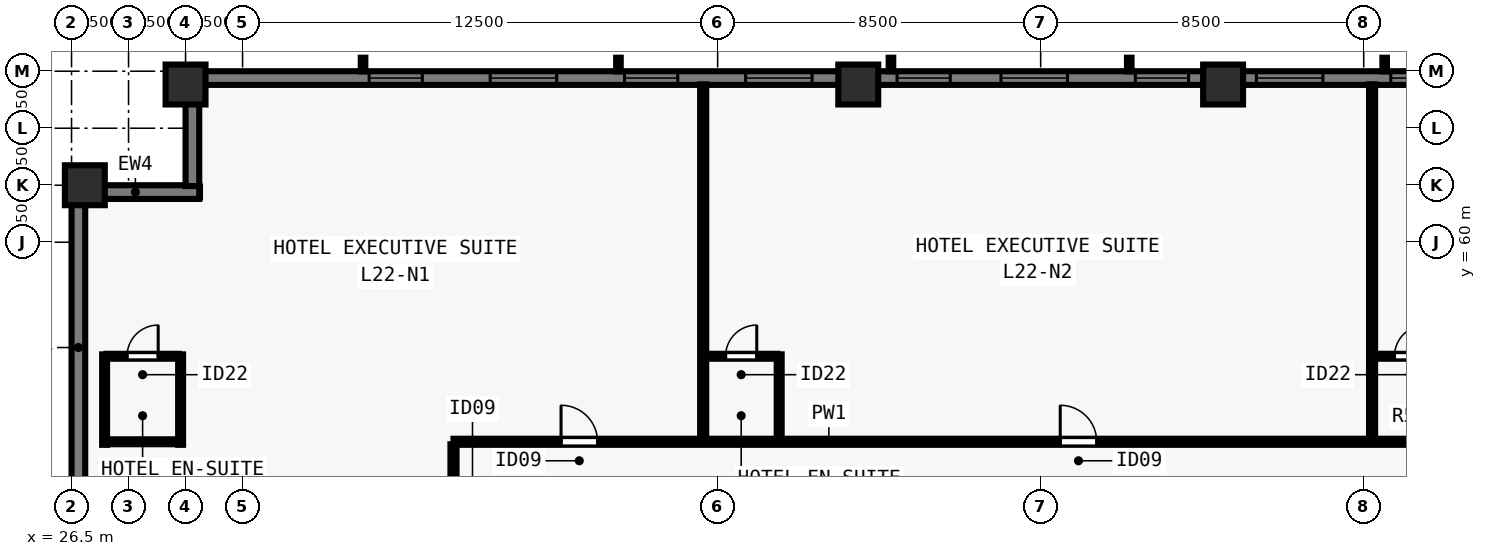
"""IFC4 building model, lengths in metres.
Left out: names, types, materials, properties, quantities, classifications, styles, units other than length and angle.
Written with IfcOpenShell. Run it as: python <this file> out.ifc"""

import sys

from ifc_helpers import new_model, si_unit, direction, frame, frame_2d, origin, origin_2d, place, context, subcontext, project, spatial, rectangle, extrude, element, fill, save


model = new_model("IFC4")
c1 = context("Model", 3, precision=1e-05, world=origin(), true_north=direction((0.0, 1.0)))
c2 = subcontext(c1, "Body", "Model", "MODEL_VIEW")
j1 = project(units=[si_unit("LENGTHUNIT", "METRE"), si_unit("PLANEANGLEUNIT", "RADIAN")], contexts=[c1])
p1 = place(None, origin())
s1 = spatial("IfcSite", under=j1, at=p1, CompositionType="ELEMENT")
p2 = place(p1, origin())
s2 = spatial("IfcBuilding", under=s1, at=p2, CompositionType="ELEMENT")
p3 = place(p2, frame((0.0, 0.0, 83.0)))
s3 = spatial("IfcBuildingStorey", under=s2, at=p3, CompositionType="ELEMENT", Elevation=83.0)
for number, where, z_axis, x_axis in (
    (1, (56.8, 64.15, 0.0), (0.0, 0.0, 1.0), (1.0, 0.0, 0.0)),
    (2, (47.2, 64.15, 0.0), (0.0, 0.0, 1.0), (1.0, 0.0, 0.0)),
    (3, (29.5, 64.15, 0.0), (0.0, 0.0, 1.0), (1.0, 0.0, 0.0)),
    (4, (26.85, 61.5, 0.0), (0.0, 0.0, 1.0), (0.0, 1.0, 0.0)),
):
    element("IfcColumn", number, at=place(p3, frame(where, z_axis=z_axis, x_axis=x_axis)), inside=s3, PredefinedType="COLUMN", context=c2, shape_type="SweptSolid", body=[
        extrude(rectangle(XDim=1.05, YDim=1.05, at=origin_2d()), origin(), (0.0, 0.0, 1.0), 3.5),
    ])
p4 = place(p3, frame((26.68, 16.5, 0.0), z_axis=(0.0, 0.0, 1.0), x_axis=(0.0, 1.0, 0.0)))
e5 = element("IfcWall", 5, at=p4, inside=s3, PredefinedType="SOLIDWALL", context=c2, shape_type="SweptSolid", body=[
    extrude(rectangle(XDim=44.662, YDim=0.36, at=frame_2d((22.331, 0.0))), origin(), (0.0, 0.0, 1.0), 3.28),
])
p5 = place(p4, frame((4.83, 0.0, 0.8)))
e6 = element("IfcOpeningElement", 6, at=p5, cuts=e5, PredefinedType="OPENING", context=c2, shape_type="SweptSolid", body=[
    extrude(rectangle(XDim=1.4, YDim=1.544, at=frame_2d((0.7, 0.772))), frame((0.0, 0.19, 0.0), z_axis=(0.0, -1.0, 0.0), x_axis=(1.0, 0.0, 0.0)), (0.0, 0.0, 1.0), 0.38),
])
p6 = place(p4, frame((8.015, 0.0, 0.8)))
e7 = element("IfcOpeningElement", 7, at=p6, cuts=e5, PredefinedType="OPENING", context=c2, shape_type="SweptSolid", body=[
    extrude(rectangle(XDim=1.75, YDim=1.544, at=frame_2d((0.875, 0.772))), frame((0.0, 0.19, 0.0), z_axis=(0.0, -1.0, 0.0), x_axis=(1.0, 0.0, 0.0)), (0.0, 0.0, 1.0), 0.38),
])
p7 = place(p4, frame((11.551, 0.0, 0.8)))
e8 = element("IfcOpeningElement", 8, at=p7, cuts=e5, PredefinedType="OPENING", context=c2, shape_type="SweptSolid", body=[
    extrude(rectangle(XDim=1.4, YDim=1.544, at=frame_2d((0.7, 0.772))), frame((0.0, 0.19, 0.0), z_axis=(0.0, -1.0, 0.0), x_axis=(1.0, 0.0, 0.0)), (0.0, 0.0, 1.0), 0.38),
])
p8 = place(p4, frame((18.721, 0.0, 0.8)))
e9 = element("IfcOpeningElement", 9, at=p8, cuts=e5, PredefinedType="OPENING", context=c2, shape_type="SweptSolid", body=[
    extrude(rectangle(XDim=1.4, YDim=1.544, at=frame_2d((0.7, 0.772))), frame((0.0, 0.19, 0.0), z_axis=(0.0, -1.0, 0.0), x_axis=(1.0, 0.0, 0.0)), (0.0, 0.0, 1.0), 0.38),
])
p9 = place(p4, frame((22.706, 0.0, 0.8)))
e10 = element("IfcOpeningElement", 10, at=p9, cuts=e5, PredefinedType="OPENING", context=c2, shape_type="SweptSolid", body=[
    extrude(rectangle(XDim=1.75, YDim=1.544, at=frame_2d((0.875, 0.772))), frame((0.0, 0.19, 0.0), z_axis=(0.0, -1.0, 0.0), x_axis=(1.0, 0.0, 0.0)), (0.0, 0.0, 1.0), 0.38),
])
p10 = place(p4, frame((24.991, 0.0, 0.8)))
e11 = element("IfcOpeningElement", 11, at=p10, cuts=e5, PredefinedType="OPENING", context=c2, shape_type="SweptSolid", body=[
    extrude(rectangle(XDim=1.4, YDim=1.544, at=frame_2d((0.7, 0.772))), frame((0.0, 0.19, 0.0), z_axis=(0.0, -1.0, 0.0), x_axis=(1.0, 0.0, 0.0)), (0.0, 0.0, 1.0), 0.38),
])
p11 = place(p4, frame((28.177, 0.0, 0.8)))
e12 = element("IfcOpeningElement", 12, at=p11, cuts=e5, PredefinedType="OPENING", context=c2, shape_type="SweptSolid", body=[
    extrude(rectangle(XDim=1.75, YDim=1.544, at=frame_2d((0.875, 0.772))), frame((0.0, 0.19, 0.0), z_axis=(0.0, -1.0, 0.0), x_axis=(1.0, 0.0, 0.0)), (0.0, 0.0, 1.0), 0.38),
])
p12 = place(p4, frame((31.711, 0.0, 0.8)))
e13 = element("IfcOpeningElement", 13, at=p12, cuts=e5, PredefinedType="OPENING", context=c2, shape_type="SweptSolid", body=[
    extrude(rectangle(XDim=1.4, YDim=1.544, at=frame_2d((0.7, 0.772))), frame((0.0, 0.19, 0.0), z_axis=(0.0, -1.0, 0.0), x_axis=(1.0, 0.0, 0.0)), (0.0, 0.0, 1.0), 0.38),
])
p13 = place(p4, frame((34.897, 0.0, 0.8)))
e14 = element("IfcOpeningElement", 14, at=p13, cuts=e5, PredefinedType="OPENING", context=c2, shape_type="SweptSolid", body=[
    extrude(rectangle(XDim=1.75, YDim=1.544, at=frame_2d((0.875, 0.772))), frame((0.0, 0.19, 0.0), z_axis=(0.0, -1.0, 0.0), x_axis=(1.0, 0.0, 0.0)), (0.0, 0.0, 1.0), 0.38),
])
p14 = place(p3, frame((26.5, 61.32, 0.0), z_axis=(0.0, 0.0, 1.0), x_axis=(1.0, 0.0, 0.0)))
e15 = element("IfcWall", 15, at=p14, inside=s3, PredefinedType="SOLIDWALL", context=c2, shape_type="SweptSolid", body=[
    extrude(rectangle(XDim=3.36, YDim=0.36, at=frame_2d((1.68, 0.0))), origin(), (0.0, 0.0, 1.0), 3.28),
])
p15 = place(p3, frame((29.68, 61.478, 0.0), z_axis=(0.0, 0.0, 1.0), x_axis=(0.0, 1.0, 0.0)))
e16 = element("IfcWall", 16, at=p15, inside=s3, PredefinedType="SOLIDWALL", context=c2, shape_type="SweptSolid", body=[
    extrude(rectangle(XDim=2.684, YDim=0.36, at=frame_2d((1.342, 0.0))), origin(), (0.0, 0.0, 1.0), 3.28),
])
p16 = place(p3, frame((29.5, 64.32, 0.0), z_axis=(0.0, 0.0, 1.0), x_axis=(1.0, 0.0, 0.0)))
e17 = element("IfcWall", 17, at=p16, inside=s3, PredefinedType="SOLIDWALL", context=c2, shape_type="SweptSolid", body=[
    extrude(rectangle(XDim=44.662, YDim=0.36, at=frame_2d((22.331, 0.0))), origin(), (0.0, 0.0, 1.0), 3.28),
])
p17 = place(p16, frame((4.83, 0.0, 0.8)))
e18 = element("IfcOpeningElement", 18, at=p17, cuts=e17, PredefinedType="OPENING", context=c2, shape_type="SweptSolid", body=[
    extrude(rectangle(XDim=1.4, YDim=1.544, at=frame_2d((0.7, 0.772))), frame((0.0, 0.19, 0.0), z_axis=(0.0, -1.0, 0.0), x_axis=(1.0, 0.0, 0.0)), (0.0, 0.0, 1.0), 0.38),
])
p18 = place(p16, frame((8.015, 0.0, 0.8)))
e19 = element("IfcOpeningElement", 19, at=p18, cuts=e17, PredefinedType="OPENING", context=c2, shape_type="SweptSolid", body=[
    extrude(rectangle(XDim=1.75, YDim=1.544, at=frame_2d((0.875, 0.772))), frame((0.0, 0.19, 0.0), z_axis=(0.0, -1.0, 0.0), x_axis=(1.0, 0.0, 0.0)), (0.0, 0.0, 1.0), 0.38),
])
p19 = place(p16, frame((11.551, 0.0, 0.8)))
e20 = element("IfcOpeningElement", 20, at=p19, cuts=e17, PredefinedType="OPENING", context=c2, shape_type="SweptSolid", body=[
    extrude(rectangle(XDim=1.4, YDim=1.544, at=frame_2d((0.7, 0.772))), frame((0.0, 0.19, 0.0), z_axis=(0.0, -1.0, 0.0), x_axis=(1.0, 0.0, 0.0)), (0.0, 0.0, 1.0), 0.38),
])
p20 = place(p16, frame((14.736, 0.0, 0.8)))
e21 = element("IfcOpeningElement", 21, at=p20, cuts=e17, PredefinedType="OPENING", context=c2, shape_type="SweptSolid", body=[
    extrude(rectangle(XDim=1.75, YDim=1.544, at=frame_2d((0.875, 0.772))), frame((0.0, 0.19, 0.0), z_axis=(0.0, -1.0, 0.0), x_axis=(1.0, 0.0, 0.0)), (0.0, 0.0, 1.0), 0.38),
])
p21 = place(p16, frame((18.721, 0.0, 0.8)))
e22 = element("IfcOpeningElement", 22, at=p21, cuts=e17, PredefinedType="OPENING", context=c2, shape_type="SweptSolid", body=[
    extrude(rectangle(XDim=1.4, YDim=1.544, at=frame_2d((0.7, 0.772))), frame((0.0, 0.19, 0.0), z_axis=(0.0, -1.0, 0.0), x_axis=(1.0, 0.0, 0.0)), (0.0, 0.0, 1.0), 0.38),
])
p22 = place(p16, frame((21.456, 0.0, 0.8)))
e23 = element("IfcOpeningElement", 23, at=p22, cuts=e17, PredefinedType="OPENING", context=c2, shape_type="SweptSolid", body=[
    extrude(rectangle(XDim=1.75, YDim=1.544, at=frame_2d((0.875, 0.772))), frame((0.0, 0.19, 0.0), z_axis=(0.0, -1.0, 0.0), x_axis=(1.0, 0.0, 0.0)), (0.0, 0.0, 1.0), 0.38),
])
p23 = place(p16, frame((24.991, 0.0, 0.8)))
e24 = element("IfcOpeningElement", 24, at=p23, cuts=e17, PredefinedType="OPENING", context=c2, shape_type="SweptSolid", body=[
    extrude(rectangle(XDim=1.4, YDim=1.544, at=frame_2d((0.7, 0.772))), frame((0.0, 0.19, 0.0), z_axis=(0.0, -1.0, 0.0), x_axis=(1.0, 0.0, 0.0)), (0.0, 0.0, 1.0), 0.38),
])
p24 = place(p16, frame((28.177, 0.0, 0.8)))
e25 = element("IfcOpeningElement", 25, at=p24, cuts=e17, PredefinedType="OPENING", context=c2, shape_type="SweptSolid", body=[
    extrude(rectangle(XDim=1.75, YDim=1.544, at=frame_2d((0.875, 0.772))), frame((0.0, 0.19, 0.0), z_axis=(0.0, -1.0, 0.0), x_axis=(1.0, 0.0, 0.0)), (0.0, 0.0, 1.0), 0.38),
])
p25 = place(p16, frame((31.711, 0.0, 0.8)))
e26 = element("IfcOpeningElement", 26, at=p25, cuts=e17, PredefinedType="OPENING", context=c2, shape_type="SweptSolid", body=[
    extrude(rectangle(XDim=1.4, YDim=1.544, at=frame_2d((0.7, 0.772))), frame((0.0, 0.19, 0.0), z_axis=(0.0, -1.0, 0.0), x_axis=(1.0, 0.0, 0.0)), (0.0, 0.0, 1.0), 0.38),
])
p26 = place(p16, frame((34.897, 0.0, 0.8)))
e27 = element("IfcOpeningElement", 27, at=p26, cuts=e17, PredefinedType="OPENING", context=c2, shape_type="SweptSolid", body=[
    extrude(rectangle(XDim=1.75, YDim=1.544, at=frame_2d((0.875, 0.772))), frame((0.0, 0.19, 0.0), z_axis=(0.0, -1.0, 0.0), x_axis=(1.0, 0.0, 0.0)), (0.0, 0.0, 1.0), 0.38),
])
p27 = place(p16, frame((38.432, 0.0, 0.8)))
e28 = element("IfcOpeningElement", 28, at=p27, cuts=e17, PredefinedType="OPENING", context=c2, shape_type="SweptSolid", body=[
    extrude(rectangle(XDim=1.4, YDim=1.544, at=frame_2d((0.7, 0.772))), frame((0.0, 0.19, 0.0), z_axis=(0.0, -1.0, 0.0), x_axis=(1.0, 0.0, 0.0)), (0.0, 0.0, 1.0), 0.38),
])
p28 = place(p3, frame((36.55, 54.75, 0.0), z_axis=(0.0, 0.0, 1.0), x_axis=(1.0, 0.0, 0.0)))
e29 = element("IfcWall", 29, at=p28, inside=s3, PredefinedType="PARTITIONING", context=c2, shape_type="SweptSolid", body=[
    extrude(rectangle(XDim=30.9, YDim=0.16, at=frame_2d((15.45, 0.0))), origin(), (0.0, 0.0, 1.0), 3.28),
])
p29 = place(p28, frame((2.83, 0.0, 0.0)))
e30 = element("IfcOpeningElement", 30, at=p29, cuts=e29, PredefinedType="OPENING", context=c2, shape_type="SweptSolid", body=[
    extrude(rectangle(XDim=0.96, YDim=2.15, at=frame_2d((0.48, 1.075))), frame((0.0, 0.09, 0.0), z_axis=(0.0, -1.0, 0.0), x_axis=(1.0, 0.0, 0.0)), (0.0, 0.0, 1.0), 0.18),
])
p30 = place(p28, frame((15.965, 0.0, 0.0)))
e31 = element("IfcOpeningElement", 31, at=p30, cuts=e29, PredefinedType="OPENING", context=c2, shape_type="SweptSolid", body=[
    extrude(rectangle(XDim=0.96, YDim=2.15, at=frame_2d((0.48, 1.075))), frame((0.0, 0.09, 0.0), z_axis=(0.0, -1.0, 0.0), x_axis=(1.0, 0.0, 0.0)), (0.0, 0.0, 1.0), 0.18),
])
p31 = place(p28, frame((28.105, 0.0, 0.0)))
e32 = element("IfcOpeningElement", 32, at=p31, cuts=e29, PredefinedType="OPENING", context=c2, shape_type="SweptSolid", body=[
    extrude(rectangle(XDim=0.96, YDim=2.15, at=frame_2d((0.48, 1.075))), frame((0.0, 0.09, 0.0), z_axis=(0.0, -1.0, 0.0), x_axis=(1.0, 0.0, 0.0)), (0.0, 0.0, 1.0), 0.18),
])
p32 = place(p3, frame((36.55, 23.315, 0.0), z_axis=(0.0, 0.0, 1.0), x_axis=(0.0, 1.0, 0.0)))
e33 = element("IfcWall", 33, at=p32, inside=s3, PredefinedType="PARTITIONING", context=c2, shape_type="SweptSolid", body=[
    extrude(rectangle(XDim=31.37, YDim=0.16, at=frame_2d((15.685, 0.0))), origin(), (0.0, 0.0, 1.0), 3.28),
])
p33 = place(p32, frame((4.848, 0.0, 0.0)))
e34 = element("IfcOpeningElement", 34, at=p33, cuts=e33, PredefinedType="OPENING", context=c2, shape_type="SweptSolid", body=[
    extrude(rectangle(XDim=0.96, YDim=2.15, at=frame_2d((0.48, 1.075))), frame((0.0, 0.09, 0.0), z_axis=(0.0, -1.0, 0.0), x_axis=(1.0, 0.0, 0.0)), (0.0, 0.0, 1.0), 0.18),
])
p34 = place(p32, frame((12.39, 0.0, 0.0)))
e35 = element("IfcOpeningElement", 35, at=p34, cuts=e33, PredefinedType="OPENING", context=c2, shape_type="SweptSolid", body=[
    extrude(rectangle(XDim=0.96, YDim=2.15, at=frame_2d((0.48, 1.075))), frame((0.0, 0.09, 0.0), z_axis=(0.0, -1.0, 0.0), x_axis=(1.0, 0.0, 0.0)), (0.0, 0.0, 1.0), 0.18),
])
p35 = place(p32, frame((20.265, 0.0, 0.0)))
e36 = element("IfcOpeningElement", 36, at=p35, cuts=e33, PredefinedType="OPENING", context=c2, shape_type="SweptSolid", body=[
    extrude(rectangle(XDim=0.96, YDim=2.15, at=frame_2d((0.48, 1.075))), frame((0.0, 0.09, 0.0), z_axis=(0.0, -1.0, 0.0), x_axis=(1.0, 0.0, 0.0)), (0.0, 0.0, 1.0), 0.18),
])
p36 = place(p32, frame((28.223, 0.0, 0.0)))
e37 = element("IfcOpeningElement", 37, at=p36, cuts=e33, PredefinedType="OPENING", context=c2, shape_type="SweptSolid", body=[
    extrude(rectangle(XDim=0.96, YDim=2.15, at=frame_2d((0.48, 1.075))), frame((0.0, 0.09, 0.0), z_axis=(0.0, -1.0, 0.0), x_axis=(1.0, 0.0, 0.0)), (0.0, 0.0, 1.0), 0.18),
])
for number, where, z_axis, x_axis in (
    (38, (27.37, 54.67, 0.0), (0.0, 0.0, 1.0), (0.0, 1.0, 0.0)),
    (39, (29.37, 54.67, 0.0), (0.0, 0.0, 1.0), (0.0, 1.0, 0.0)),
):
    element("IfcWall", number, at=place(p3, frame(where, z_axis=z_axis, x_axis=x_axis)), inside=s3, PredefinedType="PLUMBINGWALL", context=c2, shape_type="SweptSolid", body=[
        extrude(rectangle(XDim=2.38, YDim=0.13, at=frame_2d((1.19, 0.0))), origin(), (0.0, 0.0, 1.0), 3.28),
    ])
p37 = place(p3, frame((27.42, 57.0, 0.0), z_axis=(0.0, 0.0, 1.0), x_axis=(1.0, 0.0, 0.0)))
e40 = element("IfcWall", 40, at=p37, inside=s3, PredefinedType="PLUMBINGWALL", context=c2, shape_type="SweptSolid", body=[
    extrude(rectangle(XDim=1.9, YDim=0.13, at=frame_2d((0.95, 0.0))), origin(), (0.0, 0.0, 1.0), 3.28),
])
p38 = place(p37, frame((0.54, 0.0, 0.0)))
e41 = element("IfcOpeningElement", 41, at=p38, cuts=e40, PredefinedType="OPENING", context=c2, shape_type="SweptSolid", body=[
    extrude(rectangle(XDim=0.82, YDim=2.1, at=frame_2d((0.41, 1.05))), frame((0.0, 0.075, 0.0), z_axis=(0.0, -1.0, 0.0), x_axis=(1.0, 0.0, 0.0)), (0.0, 0.0, 1.0), 0.15),
])
p39 = place(p3, frame((27.42, 54.75, 0.0), z_axis=(0.0, 0.0, 1.0), x_axis=(1.0, 0.0, 0.0)))
e42 = element("IfcWall", 42, at=p39, inside=s3, PredefinedType="PLUMBINGWALL", context=c2, shape_type="SweptSolid", body=[
    extrude(rectangle(XDim=1.9, YDim=0.13, at=frame_2d((0.95, 0.0))), origin(), (0.0, 0.0, 1.0), 3.28),
])
p40 = place(p3, frame((43.12, 54.815, 0.0), z_axis=(0.0, 0.0, 1.0), x_axis=(0.0, 1.0, 0.0)))
e43 = element("IfcWall", 43, at=p40, inside=s3, PredefinedType="PARTITIONING", context=c2, shape_type="SweptSolid", body=[
    extrude(rectangle(XDim=9.34, YDim=0.16, at=frame_2d((4.67, 0.0))), origin(), (0.0, 0.0, 1.0), 3.28),
])
p41 = place(p3, frame((45.12, 54.815, 0.0), z_axis=(0.0, 0.0, 1.0), x_axis=(0.0, 1.0, 0.0)))
e44 = element("IfcWall", 44, at=p41, inside=s3, PredefinedType="PLUMBINGWALL", context=c2, shape_type="SweptSolid", body=[
    extrude(rectangle(XDim=2.235, YDim=0.13, at=frame_2d((1.118, 0.0))), origin(), (0.0, 0.0, 1.0), 3.28),
])
p42 = place(p3, frame((43.185, 57.0, 0.0), z_axis=(0.0, 0.0, 1.0), x_axis=(1.0, 0.0, 0.0)))
e45 = element("IfcWall", 45, at=p42, inside=s3, PredefinedType="PLUMBINGWALL", context=c2, shape_type="SweptSolid", body=[
    extrude(rectangle(XDim=1.885, YDim=0.13, at=frame_2d((0.942, 0.0))), origin(), (0.0, 0.0, 1.0), 3.28),
])
p43 = place(p42, frame((0.525, 0.0, 0.0)))
e46 = element("IfcOpeningElement", 46, at=p43, cuts=e45, PredefinedType="OPENING", context=c2, shape_type="SweptSolid", body=[
    extrude(rectangle(XDim=0.82, YDim=2.1, at=frame_2d((0.41, 1.05))), frame((0.0, 0.075, 0.0), z_axis=(0.0, -1.0, 0.0), x_axis=(1.0, 0.0, 0.0)), (0.0, 0.0, 1.0), 0.15),
])
p44 = place(p3, frame((60.72, 54.815, 0.0), z_axis=(0.0, 0.0, 1.0), x_axis=(0.0, 1.0, 0.0)))
e47 = element("IfcWall", 47, at=p44, inside=s3, PredefinedType="PARTITIONING", context=c2, shape_type="SweptSolid", body=[
    extrude(rectangle(XDim=9.34, YDim=0.16, at=frame_2d((4.67, 0.0))), origin(), (0.0, 0.0, 1.0), 3.28),
])
p45 = place(p3, frame((60.785, 57.0, 0.0), z_axis=(0.0, 0.0, 1.0), x_axis=(1.0, 0.0, 0.0)))
e48 = element("IfcWall", 48, at=p45, inside=s3, PredefinedType="PLUMBINGWALL", context=c2, shape_type="SweptSolid", body=[
    extrude(rectangle(XDim=1.885, YDim=0.13, at=frame_2d((0.942, 0.0))), origin(), (0.0, 0.0, 1.0), 3.28),
])
p46 = place(p45, frame((0.525, 0.0, 0.0)))
e49 = element("IfcOpeningElement", 49, at=p46, cuts=e48, PredefinedType="OPENING", context=c2, shape_type="SweptSolid", body=[
    extrude(rectangle(XDim=0.82, YDim=2.1, at=frame_2d((0.41, 1.05))), frame((0.0, 0.075, 0.0), z_axis=(0.0, -1.0, 0.0), x_axis=(1.0, 0.0, 0.0)), (0.0, 0.0, 1.0), 0.15),
])
p47 = place(p17, origin())
e50 = element("IfcWindow", 50, at=p47, inside=s3, PartitioningType="SINGLE_PANEL", PredefinedType="WINDOW", context=c2, shape_type="SweptSolid", body=[
    extrude(rectangle(XDim=1.4, YDim=1.544, at=frame_2d((0.7, 0.772))), frame((0.0, -0.05, 0.0), z_axis=(0.0, -1.0, 0.0), x_axis=(1.0, 0.0, 0.0)), (0.0, 0.0, 1.0), 0.06),
])
fill(e18, e50)
p48 = place(p18, origin())
e51 = element("IfcWindow", 51, at=p48, inside=s3, PartitioningType="SINGLE_PANEL", PredefinedType="WINDOW", context=c2, shape_type="SweptSolid", body=[
    extrude(rectangle(XDim=1.75, YDim=1.544, at=frame_2d((0.875, 0.772))), frame((0.0, -0.05, 0.0), z_axis=(0.0, -1.0, 0.0), x_axis=(1.0, 0.0, 0.0)), (0.0, 0.0, 1.0), 0.06),
])
fill(e19, e51)
p49 = place(p19, origin())
e52 = element("IfcWindow", 52, at=p49, inside=s3, PartitioningType="SINGLE_PANEL", PredefinedType="WINDOW", context=c2, shape_type="SweptSolid", body=[
    extrude(rectangle(XDim=1.4, YDim=1.544, at=frame_2d((0.7, 0.772))), frame((0.0, -0.05, 0.0), z_axis=(0.0, -1.0, 0.0), x_axis=(1.0, 0.0, 0.0)), (0.0, 0.0, 1.0), 0.06),
])
fill(e20, e52)
p50 = place(p20, origin())
e53 = element("IfcWindow", 53, at=p50, inside=s3, PartitioningType="SINGLE_PANEL", PredefinedType="WINDOW", context=c2, shape_type="SweptSolid", body=[
    extrude(rectangle(XDim=1.75, YDim=1.544, at=frame_2d((0.875, 0.772))), frame((0.0, -0.05, 0.0), z_axis=(0.0, -1.0, 0.0), x_axis=(1.0, 0.0, 0.0)), (0.0, 0.0, 1.0), 0.06),
])
fill(e21, e53)
p51 = place(p21, origin())
e54 = element("IfcWindow", 54, at=p51, inside=s3, PartitioningType="SINGLE_PANEL", PredefinedType="WINDOW", context=c2, shape_type="SweptSolid", body=[
    extrude(rectangle(XDim=1.4, YDim=1.544, at=frame_2d((0.7, 0.772))), frame((0.0, -0.05, 0.0), z_axis=(0.0, -1.0, 0.0), x_axis=(1.0, 0.0, 0.0)), (0.0, 0.0, 1.0), 0.06),
])
fill(e22, e54)
p52 = place(p22, origin())
e55 = element("IfcWindow", 55, at=p52, inside=s3, PartitioningType="SINGLE_PANEL", PredefinedType="WINDOW", context=c2, shape_type="SweptSolid", body=[
    extrude(rectangle(XDim=1.75, YDim=1.544, at=frame_2d((0.875, 0.772))), frame((0.0, -0.05, 0.0), z_axis=(0.0, -1.0, 0.0), x_axis=(1.0, 0.0, 0.0)), (0.0, 0.0, 1.0), 0.06),
])
fill(e23, e55)
p53 = place(p23, origin())
e56 = element("IfcWindow", 56, at=p53, inside=s3, PartitioningType="SINGLE_PANEL", PredefinedType="WINDOW", context=c2, shape_type="SweptSolid", body=[
    extrude(rectangle(XDim=1.4, YDim=1.544, at=frame_2d((0.7, 0.772))), frame((0.0, -0.05, 0.0), z_axis=(0.0, -1.0, 0.0), x_axis=(1.0, 0.0, 0.0)), (0.0, 0.0, 1.0), 0.06),
])
fill(e24, e56)
p54 = place(p24, origin())
e57 = element("IfcWindow", 57, at=p54, inside=s3, PartitioningType="SINGLE_PANEL", PredefinedType="WINDOW", context=c2, shape_type="SweptSolid", body=[
    extrude(rectangle(XDim=1.75, YDim=1.544, at=frame_2d((0.875, 0.772))), frame((0.0, -0.05, 0.0), z_axis=(0.0, -1.0, 0.0), x_axis=(1.0, 0.0, 0.0)), (0.0, 0.0, 1.0), 0.06),
])
fill(e25, e57)
p55 = place(p25, origin())
e58 = element("IfcWindow", 58, at=p55, inside=s3, PartitioningType="SINGLE_PANEL", PredefinedType="WINDOW", context=c2, shape_type="SweptSolid", body=[
    extrude(rectangle(XDim=1.4, YDim=1.544, at=frame_2d((0.7, 0.772))), frame((0.0, -0.05, 0.0), z_axis=(0.0, -1.0, 0.0), x_axis=(1.0, 0.0, 0.0)), (0.0, 0.0, 1.0), 0.06),
])
fill(e26, e58)
p56 = place(p38, origin())
e59 = element("IfcDoor", 59, at=p56, inside=s3, OperationType="SINGLE_SWING_RIGHT", PredefinedType="DOOR", context=c2, shape_type="SweptSolid", body=[
    extrude(rectangle(XDim=0.82, YDim=2.1, at=frame_2d((0.41, 1.05))), frame((0.0, 0.025, 0.0), z_axis=(0.0, -1.0, 0.0), x_axis=(1.0, 0.0, 0.0)), (0.0, 0.0, 1.0), 0.05),
])
fill(e41, e59)
p57 = place(p29, origin())
e60 = element("IfcDoor", 60, at=p57, inside=s3, OperationType="SINGLE_SWING_LEFT", PredefinedType="DOOR", context=c2, shape_type="SweptSolid", body=[
    extrude(rectangle(XDim=0.96, YDim=2.15, at=frame_2d((0.48, 1.075))), frame((0.0, 0.025, 0.0), z_axis=(0.0, -1.0, 0.0), x_axis=(1.0, 0.0, 0.0)), (0.0, 0.0, 1.0), 0.05),
])
fill(e30, e60)
p58 = place(p43, origin())
e61 = element("IfcDoor", 61, at=p58, inside=s3, OperationType="SINGLE_SWING_RIGHT", PredefinedType="DOOR", context=c2, shape_type="SweptSolid", body=[
    extrude(rectangle(XDim=0.82, YDim=2.1, at=frame_2d((0.41, 1.05))), frame((0.0, 0.025, 0.0), z_axis=(0.0, -1.0, 0.0), x_axis=(1.0, 0.0, 0.0)), (0.0, 0.0, 1.0), 0.05),
])
fill(e46, e61)
p59 = place(p30, origin())
e62 = element("IfcDoor", 62, at=p59, inside=s3, OperationType="SINGLE_SWING_LEFT", PredefinedType="DOOR", context=c2, shape_type="SweptSolid", body=[
    extrude(rectangle(XDim=0.96, YDim=2.15, at=frame_2d((0.48, 1.075))), frame((0.0, 0.025, 0.0), z_axis=(0.0, -1.0, 0.0), x_axis=(1.0, 0.0, 0.0)), (0.0, 0.0, 1.0), 0.05),
])
fill(e31, e62)
p60 = place(p46, origin())
e63 = element("IfcDoor", 63, at=p60, inside=s3, OperationType="SINGLE_SWING_RIGHT", PredefinedType="DOOR", context=c2, shape_type="SweptSolid", body=[
    extrude(rectangle(XDim=0.82, YDim=2.1, at=frame_2d((0.41, 1.05))), frame((0.0, 0.025, 0.0), z_axis=(0.0, -1.0, 0.0), x_axis=(1.0, 0.0, 0.0)), (0.0, 0.0, 1.0), 0.05),
])
fill(e49, e63)
save(model, sys.argv[1])
